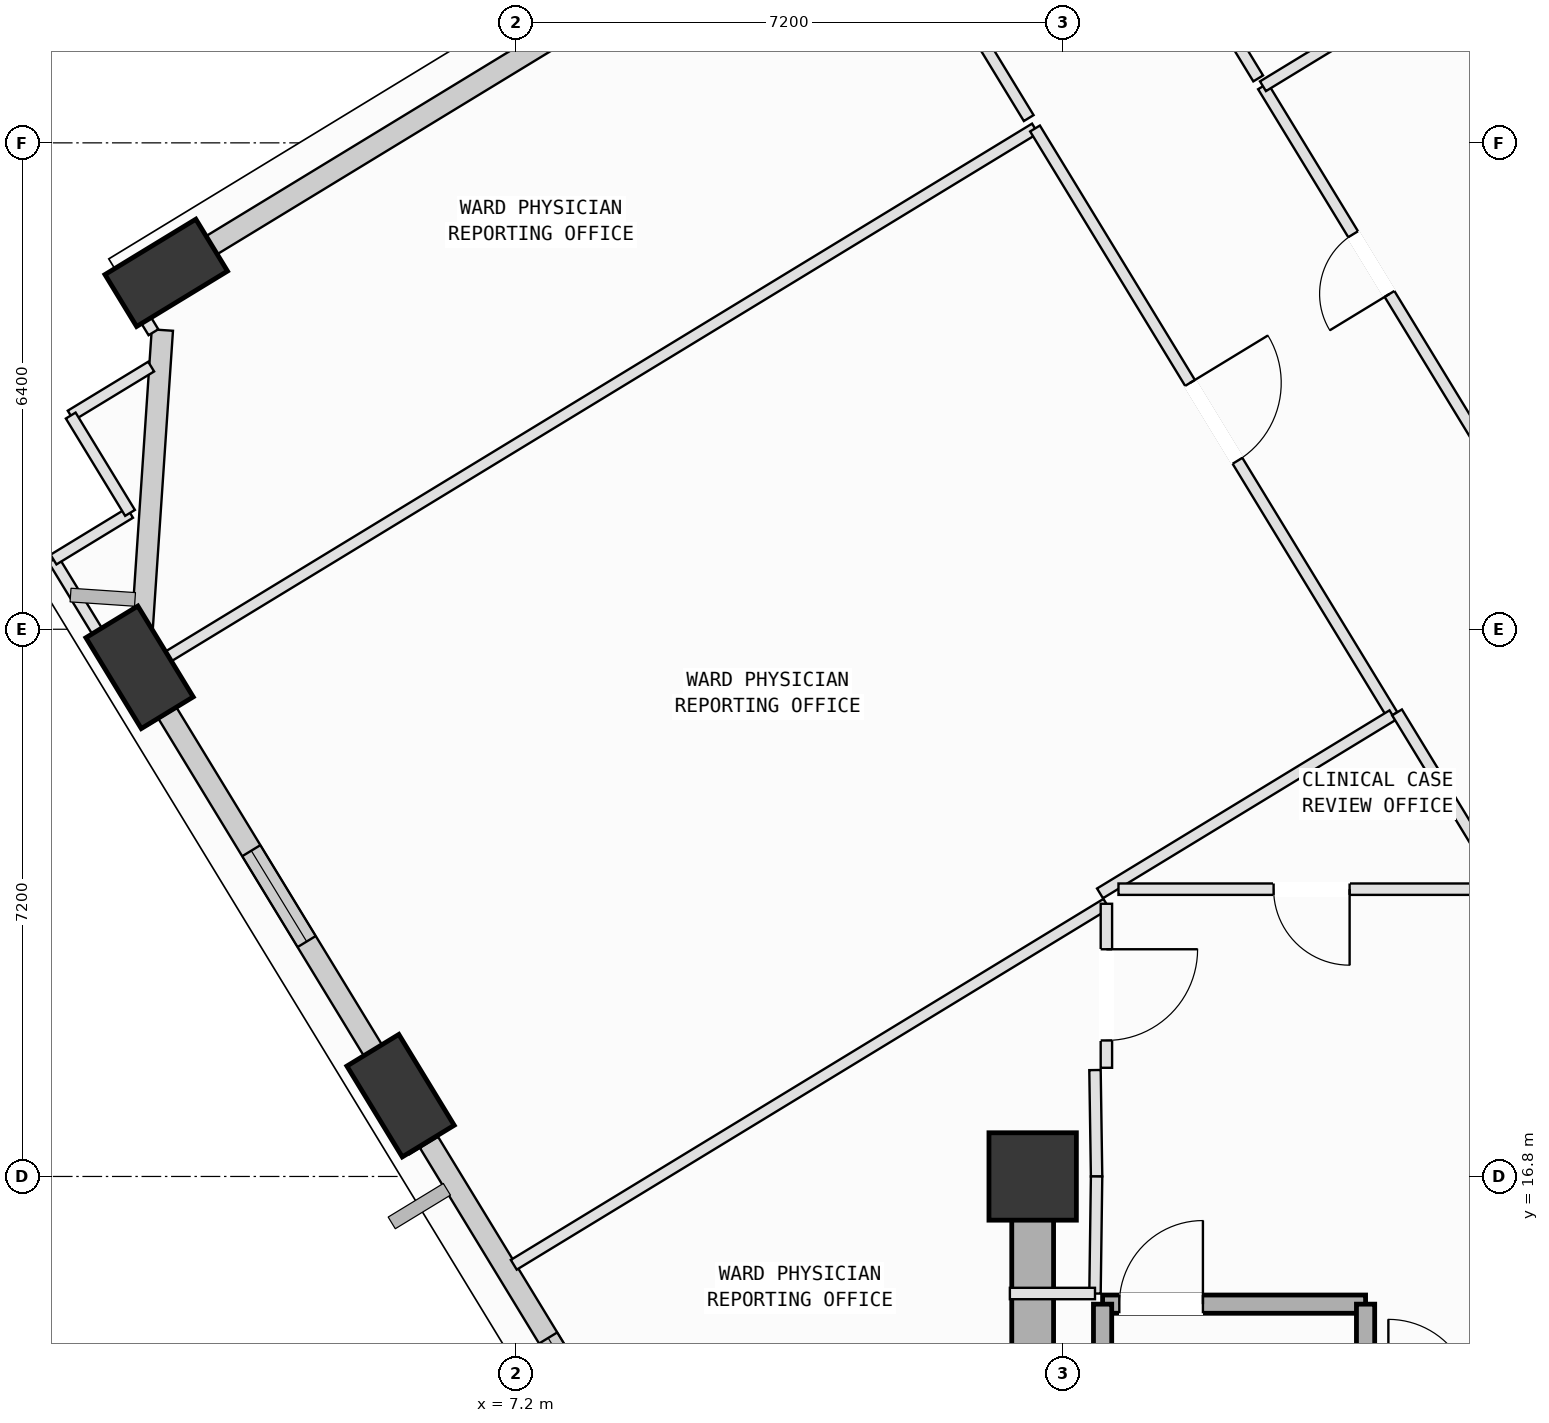
"""IFC4 building model, lengths in metres.
Left out: names, types, materials, properties, quantities, classifications, styles, units other than length and angle.
Written with IfcOpenShell. Run it as: python <this file> out.ifc"""

import sys

from ifc_helpers import new_model, si_unit, direction, frame, frame_2d, origin, origin_2d, place, context, subcontext, project, spatial, rectangle, extrude, element, fill, save


model = new_model("IFC4")
c1 = context("Model", 3, precision=1e-05, world=origin(), true_north=direction((0.0, 1.0)))
c2 = subcontext(c1, "Body", "Model", "MODEL_VIEW")
j1 = project(units=[si_unit("LENGTHUNIT", "METRE"), si_unit("PLANEANGLEUNIT", "RADIAN")], contexts=[c1])
p1 = place(None, origin())
s1 = spatial("IfcSite", under=j1, at=p1, CompositionType="ELEMENT")
p2 = place(p1, origin())
s2 = spatial("IfcBuilding", under=s1, at=p2, CompositionType="ELEMENT")
p3 = place(p2, frame((0.0, 0.0, 157.8)))
s3 = spatial("IfcBuildingStorey", under=s2, at=p3, CompositionType="ELEMENT", Elevation=157.8)
p4 = place(p3, frame((14.0, 16.8, 0.0), z_axis=(0.0, 0.0, 1.0), x_axis=(1.0, 0.0, 0.0)))
e1 = element("IfcColumn", 1, at=p4, inside=s3, PredefinedType="COLUMN", context=c2, shape_type="SweptSolid", body=[
    extrude(rectangle(XDim=1.15, YDim=1.15, at=origin_2d()), origin(), (0.0, 0.0, 1.0), 4.0),
])
p5 = place(p3, frame((2.6, 28.69, 0.002), z_axis=(-0.014904008756, -0.127532270045, 0.99172243628), x_axis=(0.908122138769, 0.413342067072, 0.066802070824)))
e2 = element("IfcColumn", 2, at=p5, inside=s3, PredefinedType="COLUMN", context=c2, shape_type="SweptSolid", body=[
    extrude(rectangle(XDim=1.4, YDim=0.8, at=origin_2d()), origin(), (0.0, 0.0, 1.0), 4.03),
])
p6 = place(p3, frame((2.25, 23.499, 0.002), z_axis=(0.006421586206, -0.128795210131, 0.991650420803), x_axis=(-0.561790948071, 0.819916255425, 0.110128401217)))
e3 = element("IfcColumn", 3, at=p6, inside=s3, PredefinedType="COLUMN", context=c2, shape_type="SweptSolid", body=[
    extrude(rectangle(XDim=1.4, YDim=0.8, at=origin_2d()), origin(), (0.0, 0.0, 1.0), 4.03),
])
p7 = place(p3, frame((5.683, 17.863, 0.002), z_axis=(0.029481291731, -0.114710128938, 0.99296144928), x_axis=(-0.714969676256, 0.691800343152, 0.101146662078)))
e4 = element("IfcColumn", 4, at=p7, inside=s3, PredefinedType="COLUMN", context=c2, shape_type="SweptSolid", body=[
    extrude(rectangle(XDim=1.4, YDim=0.8, at=origin_2d()), origin(), (0.0, 0.0, 1.0), 4.025),
])
p8 = place(p3, frame((2.851, 28.842, 0.0), z_axis=(0.0, 0.0, 1.0), x_axis=(0.854006543664, 0.520262264036, 0.0)))
e5 = element("IfcWall", 5, at=p8, inside=s3, PredefinedType="SOLIDWALL", context=c2, shape_type="SweptSolid", body=[
    extrude(rectangle(XDim=7.27, YDim=0.28, at=frame_2d((3.635, 0.0))), origin(), (0.0, 0.0, 1.0), 3.165),
])
p9 = place(p3, frame((2.265, 23.736, 0.0), z_axis=(0.0, 0.0, 1.0), x_axis=(0.067492637581, 0.997719772217, 0.0)))
e6 = element("IfcWall", 6, at=p9, inside=s3, PredefinedType="SOLIDWALL", context=c2, shape_type="SweptSolid", body=[
    extrude(rectangle(XDim=4.21, YDim=0.28, at=frame_2d((2.105, 0.0))), origin(), (0.0, 0.0, 1.0), 3.165),
])
p10 = place(p3, frame((5.546, 18.088, 0.0), z_axis=(0.0, 0.0, 1.0), x_axis=(-0.5202703237, 0.85400163365, 0.0)))
e7 = element("IfcWall", 7, at=p10, inside=s3, PredefinedType="SOLIDWALL", context=c2, shape_type="SweptSolid", body=[
    extrude(rectangle(XDim=5.628, YDim=0.28, at=frame_2d((2.814, 0.0))), origin(), (0.0, 0.0, 1.0), 3.165),
])
p11 = place(p10, frame((2.111, 0.0, 0.75)))
e8 = element("IfcOpeningElement", 8, at=p11, cuts=e7, PredefinedType="OPENING", context=c2, shape_type="SweptSolid", body=[
    extrude(rectangle(XDim=1.4, YDim=1.85, at=frame_2d((0.7, 0.925))), frame((0.0, 0.15, 0.0), z_axis=(0.0, -1.0, 0.0), x_axis=(1.0, 0.0, 0.0)), (0.0, 0.0, 1.0), 0.3),
])
p12 = place(p3, frame((9.003, 12.413, 0.0), z_axis=(0.0, 0.0, 1.0), x_axis=(-0.520247840467, 0.85401533036, 0.0)))
e9 = element("IfcWall", 9, at=p12, inside=s3, PredefinedType="SOLIDWALL", context=c2, shape_type="SweptSolid", body=[
    extrude(rectangle(XDim=5.662, YDim=0.28, at=frame_2d((2.831, 0.0))), origin(), (0.0, 0.0, 1.0), 3.165),
])
p13 = place(p12, frame((0.848, 0.0, 0.75)))
e10 = element("IfcOpeningElement", 10, at=p13, cuts=e9, PredefinedType="OPENING", context=c2, shape_type="SweptSolid", body=[
    extrude(rectangle(XDim=1.8, YDim=2.05, at=frame_2d((0.9, 1.025))), frame((0.0, 0.15, 0.0), z_axis=(0.0, -1.0, 0.0), x_axis=(1.0, 0.0, 0.0)), (0.0, 0.0, 1.0), 0.3),
])
p14 = place(p3, frame((14.92, 15.12, 0.0), z_axis=(0.0, 0.0, 1.0), x_axis=(1.0, 0.0, 0.0)))
e11 = element("IfcWall", 11, at=p14, inside=s3, PredefinedType="SOLIDWALL", context=c2, shape_type="SweptSolid", body=[
    extrude(rectangle(XDim=3.46, YDim=0.24, at=frame_2d((1.73, 0.0))), origin(), (0.0, 0.0, 1.0), 3.78),
])
p15 = place(p14, frame((0.22, 0.0, 0.0)))
e12 = element("IfcOpeningElement", 12, at=p15, cuts=e11, PredefinedType="OPENING", context=c2, shape_type="SweptSolid", body=[
    extrude(rectangle(XDim=1.1, YDim=2.15, at=frame_2d((0.55, 1.075))), frame((0.0, 0.13, 0.0), z_axis=(0.0, -1.0, 0.0), x_axis=(1.0, 0.0, 0.0)), (0.0, 0.0, 1.0), 0.26),
])
for number, where, z_axis, x_axis in (
    (13, (18.38, 15.12, 0.0), (0.0, 0.0, 1.0), (0.0, -1.0, 0.0)),
    (14, (14.92, 8.075, 0.0), (0.0, 0.0, 1.0), (0.0, 1.0, 0.0)),
):
    element("IfcWall", number, at=place(p3, frame(where, z_axis=z_axis, x_axis=x_axis)), inside=s3, PredefinedType="SOLIDWALL", context=c2, shape_type="SweptSolid", body=[
        extrude(rectangle(XDim=7.045, YDim=0.24, at=frame_2d((3.522, 0.0))), origin(), (0.0, 0.0, 1.0), 3.78),
    ])
p16 = place(p3, frame((14.0, 16.8, 0.0), z_axis=(0.0, 0.0, 1.0), x_axis=(0.0, -1.0, 0.0)))
e15 = element("IfcWall", 15, at=p16, inside=s3, PredefinedType="SHEAR", context=c2, shape_type="SweptSolid", body=[
    extrude(rectangle(XDim=9.0, YDim=0.55, at=frame_2d((4.5, 0.0))), origin(), (0.0, 0.0, 1.0), 3.78),
])
p17 = place(p3, frame((14.82, 18.2, 0.0), z_axis=(0.0, 0.0, 1.0), x_axis=(0.01499656939, -0.99988754513, 0.0)))
e16 = element("IfcWall", 16, at=p17, inside=s3, PredefinedType="PARTITIONING", context=c2, shape_type="SweptSolid", body=[
    extrude(rectangle(XDim=1.4, YDim=0.15, at=frame_2d((0.7, 0.0))), origin(), (0.0, 0.0, 1.0), 3.78),
])
p18 = place(p3, frame((14.841, 16.8, 0.0), z_axis=(0.0, 0.0, 1.0), x_axis=(-0.01363221443, -0.999907077048, 0.0)))
e17 = element("IfcWall", 17, at=p18, inside=s3, PredefinedType="PARTITIONING", context=c2, shape_type="SweptSolid", body=[
    extrude(rectangle(XDim=1.54, YDim=0.15, at=frame_2d((0.77, 0.0))), origin(), (0.0, 0.0, 1.0), 3.78),
])
p19 = place(p3, frame((14.82, 15.26, 0.0), z_axis=(0.0, 0.0, 1.0), x_axis=(-1.0, 0.0, 0.0)))
e18 = element("IfcWall", 18, at=p19, inside=s3, PredefinedType="PARTITIONING", context=c2, shape_type="SweptSolid", body=[
    extrude(rectangle(XDim=1.12, YDim=0.15, at=frame_2d((0.56, 0.0))), origin(), (0.0, 0.0, 1.0), 3.78),
])
p20 = place(p3, frame((7.173, 15.638, 0.0), z_axis=(0.0, 0.0, 1.0), x_axis=(0.854000204459, 0.52027266965, 0.0)))
e19 = element("IfcWall", 19, at=p20, inside=s3, PredefinedType="PARTITIONING", context=c2, shape_type="SweptSolid", body=[
    extrude(rectangle(XDim=9.13, YDim=0.15, at=frame_2d((4.565, 0.0))), origin(), (0.0, 0.0, 1.0), 3.78),
])
p21 = place(p3, frame((14.97, 20.388, 0.0), z_axis=(0.0, 0.0, 1.0), x_axis=(0.0, -1.0, 0.0)))
e20 = element("IfcWall", 20, at=p21, inside=s3, PredefinedType="PARTITIONING", context=c2, shape_type="SweptSolid", body=[
    extrude(rectangle(XDim=2.158, YDim=0.15, at=frame_2d((1.079, 0.0))), origin(), (0.0, 0.0, 1.0), 3.78),
])
p22 = place(p21, frame((0.598, 0.0, 0.0)))
e21 = element("IfcOpeningElement", 21, at=p22, cuts=e20, PredefinedType="OPENING", context=c2, shape_type="SweptSolid", body=[
    extrude(rectangle(XDim=1.2, YDim=2.15, at=frame_2d((0.6, 1.075))), frame((0.0, 0.085, 0.0), z_axis=(0.0, -1.0, 0.0), x_axis=(1.0, 0.0, 0.0)), (0.0, 0.0, 1.0), 0.17),
])
p23 = place(p3, frame((2.092, 23.316, 0.0), z_axis=(0.0, 0.0, 1.0), x_axis=(0.854007963695, 0.520259933059, 0.0)))
e22 = element("IfcWall", 22, at=p23, inside=s3, PredefinedType="PARTITIONING", context=c2, shape_type="SweptSolid", body=[
    extrude(rectangle(XDim=13.98, YDim=0.15, at=frame_2d((6.99, 0.0))), origin(), (0.0, 0.0, 1.0), 3.78),
])
p24 = place(p3, frame((14.031, 30.589, 0.0), z_axis=(0.0, 0.0, 1.0), x_axis=(0.520239078164, -0.854020668105, 0.0)))
e23 = element("IfcWall", 23, at=p24, inside=s3, PredefinedType="PARTITIONING", context=c2, shape_type="SweptSolid", body=[
    extrude(rectangle(XDim=9.04, YDim=0.15, at=frame_2d((4.52, 0.0))), origin(), (0.0, 0.0, 1.0), 3.78),
])
p25 = place(p24, frame((3.92, 0.0, 0.0)))
e24 = element("IfcOpeningElement", 24, at=p25, cuts=e23, PredefinedType="OPENING", context=c2, shape_type="SweptSolid", body=[
    extrude(rectangle(XDim=1.2, YDim=2.15, at=frame_2d((0.6, 1.075))), frame((0.0, 0.085, 0.0), z_axis=(0.0, -1.0, 0.0), x_axis=(1.0, 0.0, 0.0)), (0.0, 0.0, 1.0), 0.17),
])
p26 = place(p3, frame((18.734, 22.869, 0.0), z_axis=(0.0, 0.0, 1.0), x_axis=(-0.854021673807, -0.520237427208, 0.0)))
e25 = element("IfcWall", 25, at=p26, inside=s3, PredefinedType="PARTITIONING", context=c2, shape_type="SweptSolid", body=[
    extrude(rectangle(XDim=4.506, YDim=0.15, at=frame_2d((2.253, 0.0))), origin(), (0.0, 0.0, 1.0), 3.78),
])
p27 = place(p3, frame((5.861, 17.129, 0.0), z_axis=(0.0, 0.0, 1.0), x_axis=(-0.520112490178, 0.854097768151, 0.0)))
e26 = element("IfcWall", 26, at=p27, inside=s3, PredefinedType="PARTITIONING", context=c2, shape_type="SweptSolid", body=[
    extrude(rectangle(XDim=0.982, YDim=0.15, at=frame_2d((0.491, 0.0))), origin(), (0.0, 0.0, 1.0), 3.165),
])
p28 = place(p3, frame((2.422, 22.774, 0.0), z_axis=(0.0, 0.0, 1.0), x_axis=(-0.520142212164, 0.854079667903, 0.0)))
e27 = element("IfcWall", 27, at=p28, inside=s3, PredefinedType="PARTITIONING", context=c2, shape_type="SweptSolid", body=[
    extrude(rectangle(XDim=0.635, YDim=0.15, at=frame_2d((0.317, 0.0))), origin(), (0.0, 0.0, 1.0), 3.165),
])
p29 = place(p3, frame((1.344, 26.812, 0.0), z_axis=(0.0, 0.0, 1.0), x_axis=(0.854206167436, 0.519934441554, 0.0)))
e28 = element("IfcWall", 28, at=p29, inside=s3, PredefinedType="PARTITIONING", context=c2, shape_type="SweptSolid", body=[
    extrude(rectangle(XDim=1.239, YDim=0.15, at=frame_2d((0.619, 0.0))), origin(), (0.0, 0.0, 1.0), 3.78),
])
p30 = place(p3, frame((2.432, 27.908, 0.0), z_axis=(0.0, 0.0, 1.0), x_axis=(-0.519606283124, 0.854405823095, 0.0)))
e29 = element("IfcWall", 29, at=p30, inside=s3, PredefinedType="PARTITIONING", context=c2, shape_type="SweptSolid", body=[
    extrude(rectangle(XDim=0.75, YDim=0.15, at=frame_2d((0.375, 0.0))), origin(), (0.0, 0.0, 1.0), 3.065),
])
p31 = place(p3, frame((2.042, 28.549, 0.0), z_axis=(0.0, 0.0, 1.0), x_axis=(0.853818147022, 0.520571389741, 0.0)))
e30 = element("IfcWall", 30, at=p31, inside=s3, PredefinedType="PARTITIONING", context=c2, shape_type="SweptSolid", body=[
    extrude(rectangle(XDim=0.843, YDim=0.15, at=frame_2d((0.422, 0.0))), origin(), (0.0, 0.0, 1.0), 3.78),
])
p32 = place(p3, frame((11.841, 34.185, 0.0), z_axis=(0.0, 0.0, 1.0), x_axis=(0.520210820935, -0.854037880765, 0.0)))
e31 = element("IfcWall", 31, at=p32, inside=s3, PredefinedType="PARTITIONING", context=c2, shape_type="SweptSolid", body=[
    extrude(rectangle(XDim=4.05, YDim=0.15, at=frame_2d((2.025, 0.0))), origin(), (0.0, 0.0, 1.0), 3.78),
])
p33 = place(p32, frame((1.7, 0.0, 0.0)))
e32 = element("IfcOpeningElement", 32, at=p33, cuts=e31, PredefinedType="OPENING", context=c2, shape_type="SweptSolid", body=[
    extrude(rectangle(XDim=1.2, YDim=2.15, at=frame_2d((0.6, 1.075))), frame((0.0, 0.085, 0.0), z_axis=(0.0, -1.0, 0.0), x_axis=(1.0, 0.0, 0.0)), (0.0, 0.0, 1.0), 0.17),
])
p34 = place(p3, frame((2.009, 23.453, 0.0), z_axis=(0.0, 0.0, 1.0), x_axis=(-0.520326364679, 0.853967490142, 0.0)))
e33 = element("IfcWall", 33, at=p34, inside=s3, PredefinedType="PARTITIONING", context=c2, shape_type="SweptSolid", body=[
    extrude(rectangle(XDim=1.715, YDim=0.15, at=frame_2d((0.857, 0.0))), origin(), (0.0, 0.0, 1.0), 3.78),
])
p35 = place(p3, frame((1.117, 24.917, 0.0), z_axis=(0.0, 0.0, 1.0), x_axis=(0.853818614976, 0.520570622222, 0.0)))
e34 = element("IfcWall", 34, at=p35, inside=s3, PredefinedType="PARTITIONING", context=c2, shape_type="SweptSolid", body=[
    extrude(rectangle(XDim=1.179, YDim=0.15, at=frame_2d((0.59, 0.0))), origin(), (0.0, 0.0, 1.0), 3.78),
])
p36 = place(p3, frame((2.124, 25.531, 0.0), z_axis=(0.0, 0.0, 1.0), x_axis=(-0.520086370604, 0.854113673414, 0.0)))
e35 = element("IfcWall", 35, at=p36, inside=s3, PredefinedType="PARTITIONING", context=c2, shape_type="SweptSolid", body=[
    extrude(rectangle(XDim=1.5, YDim=0.15, at=frame_2d((0.75, 0.0))), origin(), (0.0, 0.0, 1.0), 3.78),
])
p37 = place(p3, frame((19.881, 26.465, 0.0), z_axis=(0.0, 0.0, 1.0), x_axis=(-0.520269153485, 0.854002346561, 0.0)))
e36 = element("IfcWall", 36, at=p37, inside=s3, PredefinedType="PARTITIONING", context=c2, shape_type="SweptSolid", body=[
    extrude(rectangle(XDim=5.48, YDim=0.15, at=frame_2d((2.74, 0.0))), origin(), (0.0, 0.0, 1.0), 3.78),
])
p38 = place(p37, frame((2.28, 0.0, 0.0)))
e37 = element("IfcOpeningElement", 37, at=p38, cuts=e36, PredefinedType="OPENING", context=c2, shape_type="SweptSolid", body=[
    extrude(rectangle(XDim=0.92, YDim=2.1, at=frame_2d((0.46, 1.05))), frame((0.0, 0.085, 0.0), z_axis=(0.0, -1.0, 0.0), x_axis=(1.0, 0.0, 0.0)), (0.0, 0.0, 1.0), 0.17),
])
p39 = place(p3, frame((17.03, 31.145, 0.0), z_axis=(0.0, 0.0, 1.0), x_axis=(0.853935379197, 0.520379061988, 0.0)))
e38 = element("IfcWall", 38, at=p39, inside=s3, PredefinedType="PARTITIONING", context=c2, shape_type="SweptSolid", body=[
    extrude(rectangle(XDim=4.068, YDim=0.15, at=frame_2d((2.034, 0.0))), origin(), (0.0, 0.0, 1.0), 3.78),
])
p40 = place(p3, frame((16.967, 31.248, 0.0), z_axis=(0.0, 0.0, 1.0), x_axis=(-0.520277703675, 0.853997137618, 0.0)))
e39 = element("IfcWall", 39, at=p40, inside=s3, PredefinedType="PARTITIONING", context=c2, shape_type="SweptSolid", body=[
    extrude(rectangle(XDim=5.174, YDim=0.15, at=frame_2d((2.587, 0.0))), origin(), (0.0, 0.0, 1.0), 3.78),
])
p41 = place(p40, frame((2.127, 0.0, 0.0)))
e40 = element("IfcOpeningElement", 40, at=p41, cuts=e39, PredefinedType="OPENING", context=c2, shape_type="SweptSolid", body=[
    extrude(rectangle(XDim=0.92, YDim=2.1, at=frame_2d((0.46, 1.05))), frame((0.0, 0.085, 0.0), z_axis=(0.0, -1.0, 0.0), x_axis=(1.0, 0.0, 0.0)), (0.0, 0.0, 1.0), 0.17),
])
p42 = place(p3, frame((18.794, 22.906, 0.0), z_axis=(0.0, 0.0, 1.0), x_axis=(0.520271097481, -0.854001162251, 0.0)))
e41 = element("IfcWall", 41, at=p42, inside=s3, PredefinedType="PARTITIONING", context=c2, shape_type="SweptSolid", body=[
    extrude(rectangle(XDim=2.724, YDim=0.15, at=frame_2d((1.362, 0.0))), origin(), (0.0, 0.0, 1.0), 3.78),
])
p43 = place(p3, frame((20.211, 20.58, 0.0), z_axis=(0.0, 0.0, 1.0), x_axis=(-1.0, 0.0, 0.0)))
e42 = element("IfcWall", 42, at=p43, inside=s3, PredefinedType="PARTITIONING", context=c2, shape_type="SweptSolid", body=[
    extrude(rectangle(XDim=5.082, YDim=0.15, at=frame_2d((2.541, 0.0))), origin(), (0.0, 0.0, 1.0), 3.78),
])
p44 = place(p43, frame((2.041, 0.0, 0.0)))
e43 = element("IfcOpeningElement", 43, at=p44, cuts=e42, PredefinedType="OPENING", context=c2, shape_type="SweptSolid", body=[
    extrude(rectangle(XDim=1.0, YDim=2.12, at=frame_2d((0.5, 1.06))), frame((0.0, 0.085, 0.0), z_axis=(0.0, -1.0, 0.0), x_axis=(1.0, 0.0, 0.0)), (0.0, 0.0, 1.0), 0.17),
])
p45 = place(p11, origin())
e44 = element("IfcWindow", 44, at=p45, inside=s3, PartitioningType="SINGLE_PANEL", PredefinedType="WINDOW", context=c2, shape_type="SweptSolid", body=[
    extrude(rectangle(XDim=1.4, YDim=1.85, at=frame_2d((0.7, 0.925))), frame((0.0, 0.03, 0.0), z_axis=(0.0, -1.0, 0.0), x_axis=(1.0, 0.0, 0.0)), (0.0, 0.0, 1.0), 0.06),
])
fill(e8, e44)
p46 = place(p13, origin())
e45 = element("IfcWindow", 45, at=p46, inside=s3, PartitioningType="SINGLE_PANEL", PredefinedType="WINDOW", context=c2, shape_type="SweptSolid", body=[
    extrude(rectangle(XDim=1.8, YDim=2.05, at=frame_2d((0.9, 1.025))), frame((0.0, 0.03, 0.0), z_axis=(0.0, -1.0, 0.0), x_axis=(1.0, 0.0, 0.0)), (0.0, 0.0, 1.0), 0.06),
])
fill(e10, e45)
p47 = place(p15, origin())
e46 = element("IfcDoor", 46, at=p47, inside=s3, OperationType="SINGLE_SWING_RIGHT", PredefinedType="DOOR", context=c2, shape_type="SweptSolid", body=[
    extrude(rectangle(XDim=1.1, YDim=2.15, at=frame_2d((0.55, 1.075))), frame((0.0, 0.025, 0.0), z_axis=(0.0, -1.0, 0.0), x_axis=(1.0, 0.0, 0.0)), (0.0, 0.0, 1.0), 0.05),
])
fill(e12, e46)
p48 = place(p22, origin())
e47 = element("IfcDoor", 47, at=p48, inside=s3, OperationType="SINGLE_SWING_LEFT", PredefinedType="DOOR", context=c2, shape_type="SweptSolid", body=[
    extrude(rectangle(XDim=1.2, YDim=2.15, at=frame_2d((0.6, 1.075))), frame((0.0, 0.025, 0.0), z_axis=(0.0, -1.0, 0.0), x_axis=(1.0, 0.0, 0.0)), (0.0, 0.0, 1.0), 0.05),
])
fill(e21, e47)
p49 = place(p25, origin())
e48 = element("IfcDoor", 48, at=p49, inside=s3, OperationType="SINGLE_SWING_LEFT", PredefinedType="DOOR", context=c2, shape_type="SweptSolid", body=[
    extrude(rectangle(XDim=1.2, YDim=2.15, at=frame_2d((0.6, 1.075))), frame((0.0, 0.025, 0.0), z_axis=(0.0, -1.0, 0.0), x_axis=(1.0, 0.0, 0.0)), (0.0, 0.0, 1.0), 0.05),
])
fill(e24, e48)
p50 = place(p38, origin())
e49 = element("IfcDoor", 49, at=p50, inside=s3, OperationType="SINGLE_SWING_LEFT", PredefinedType="DOOR", context=c2, shape_type="SweptSolid", body=[
    extrude(rectangle(XDim=0.92, YDim=2.1, at=frame_2d((0.46, 1.05))), frame((0.0, 0.025, 0.0), z_axis=(0.0, -1.0, 0.0), x_axis=(1.0, 0.0, 0.0)), (0.0, 0.0, 1.0), 0.05),
])
fill(e37, e49)
p51 = place(p44, origin())
e50 = element("IfcDoor", 50, at=p51, inside=s3, OperationType="SINGLE_SWING_LEFT", PredefinedType="DOOR", context=c2, shape_type="SweptSolid", body=[
    extrude(rectangle(XDim=1.0, YDim=2.12, at=frame_2d((0.5, 1.06))), frame((0.0, 0.025, 0.0), z_axis=(0.0, -1.0, 0.0), x_axis=(1.0, 0.0, 0.0)), (0.0, 0.0, 1.0), 0.05),
])
fill(e43, e50)
save(model, sys.argv[1])
